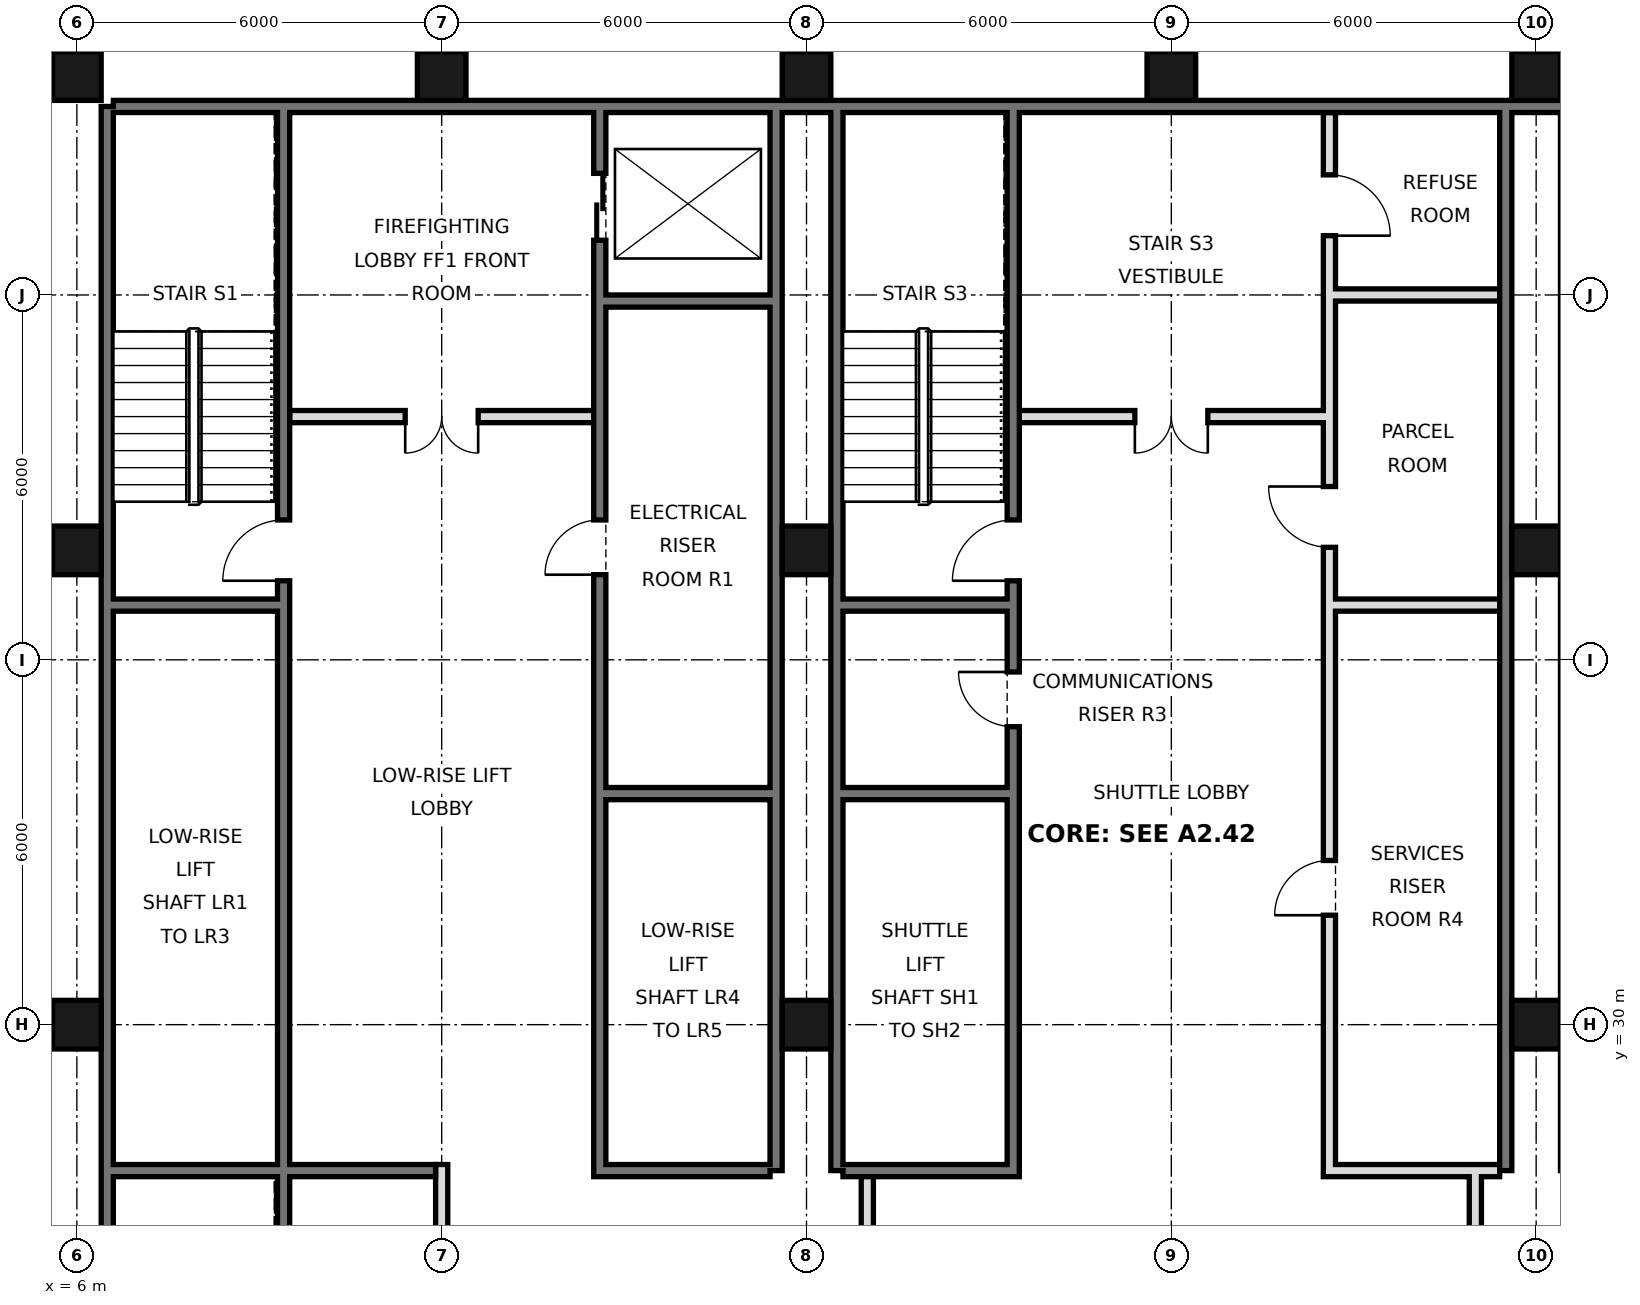
"""IFC4 building model, lengths in metres.
Left out: names, types, materials, properties, quantities, classifications, styles, units other than length and angle.
Written with IfcOpenShell. Run it as: python <this file> out.ifc"""

import sys

from ifc_helpers import new_model, si_unit, direction, frame, frame_2d, origin, origin_2d, place, context, subcontext, project, spatial, rectangle, hollow_rectangle, extrude, element, fill, save


model = new_model("IFC4")
c1 = context("Model", 3, precision=1e-05, world=origin(), true_north=direction((0.0, 1.0)))
c2 = subcontext(c1, "Body", "Model", "MODEL_VIEW")
j1 = project(units=[si_unit("LENGTHUNIT", "METRE"), si_unit("PLANEANGLEUNIT", "RADIAN")], contexts=[c1])
p1 = place(None, origin())
s1 = spatial("IfcSite", under=j1, at=p1, CompositionType="ELEMENT")
p2 = place(p1, origin())
s2 = spatial("IfcBuilding", under=s1, at=p2, CompositionType="ELEMENT")
p3 = place(p2, frame((0.0, 0.0, 167.2)))
s3 = spatial("IfcBuildingStorey", under=s2, at=p3, CompositionType="ELEMENT", Elevation=167.2)
for number, where, z_axis, x_axis in (
    (1, (6.0, 30.0, 0.0), (0.0, 0.0, 1.0), (1.0, 0.0, 0.0)),
    (2, (6.0, 37.8, 0.0), (0.0, 0.0, 1.0), (1.0, 0.0, 0.0)),
    (3, (6.0, 45.6, 0.0), (0.0, 0.0, 1.0), (1.0, 0.0, 0.0)),
    (4, (12.0, 45.6, 0.0), (0.0, 0.0, 1.0), (1.0, 0.0, 0.0)),
    (5, (18.0, 30.0, 0.0), (0.0, 0.0, 1.0), (1.0, 0.0, 0.0)),
    (6, (18.0, 37.8, 0.0), (0.0, 0.0, 1.0), (1.0, 0.0, 0.0)),
    (7, (18.0, 45.6, 0.0), (0.0, 0.0, 1.0), (1.0, 0.0, 0.0)),
    (8, (24.0, 45.6, 0.0), (0.0, 0.0, 1.0), (1.0, 0.0, 0.0)),
    (9, (30.0, 30.0, 0.0), (0.0, 0.0, 1.0), (1.0, 0.0, 0.0)),
    (10, (30.0, 37.8, 0.0), (0.0, 0.0, 1.0), (1.0, 0.0, 0.0)),
    (11, (30.0, 45.6, 0.0), (0.0, 0.0, 1.0), (1.0, 0.0, 0.0)),
):
    element("IfcColumn", number, at=place(p3, frame(where, z_axis=z_axis, x_axis=x_axis)), inside=s3, PredefinedType="COLUMN", context=c2, shape_type="SweptSolid", body=[
        extrude(hollow_rectangle(XDim=0.8, YDim=0.8, WallThickness=0.045, at=origin_2d()), origin(), (0.0, 0.0, 1.0), 3.6),
    ])
p4 = place(p3, frame((6.5, 21.6, 0.0), z_axis=(0.0, 0.0, 1.0), x_axis=(0.0, 1.0, 0.0)))
e12 = element("IfcWall", 12, at=p4, inside=s3, PredefinedType="SOLIDWALL", context=c2, shape_type="SweptSolid", body=[
    extrude(rectangle(XDim=23.5, YDim=0.2, at=frame_2d((11.75, 0.0))), origin(), (0.0, 0.0, 1.0), 3.42),
])
p5 = place(p3, frame((6.6, 45.1, 0.0), z_axis=(0.0, 0.0, 1.0), x_axis=(1.0, 0.0, 0.0)))
e13 = element("IfcWall", 13, at=p5, inside=s3, PredefinedType="SOLIDWALL", context=c2, shape_type="SweptSolid", body=[
    extrude(rectangle(XDim=34.8, YDim=0.2, at=frame_2d((17.4, 0.0))), origin(), (0.0, 0.0, 1.0), 3.42),
])
for number, where, z_axis, x_axis in (
    (14, (17.5, 27.6, 0.0), (0.0, 0.0, 1.0), (0.0, 1.0, 0.0)),
    (15, (18.5, 27.6, 0.0), (0.0, 0.0, 1.0), (0.0, 1.0, 0.0)),
    (16, (29.5, 27.6, 0.0), (0.0, 0.0, 1.0), (0.0, 1.0, 0.0)),
):
    element("IfcWall", number, at=place(p3, frame(where, z_axis=z_axis, x_axis=x_axis)), inside=s3, PredefinedType="SOLIDWALL", context=c2, shape_type="SweptSolid", body=[
        extrude(rectangle(XDim=17.5, YDim=0.2, at=frame_2d((8.75, 0.0))), origin(), (0.0, 0.0, 1.0), 3.42),
    ])
p6 = place(p3, frame((19.0, 21.6, 0.0), z_axis=(0.0, 0.0, 1.0), x_axis=(0.0, 1.0, 0.0)))
e17 = element("IfcWall", 17, at=p6, inside=s3, PredefinedType="PARTITIONING", context=c2, shape_type="SweptSolid", body=[
    extrude(rectangle(XDim=6.0, YDim=0.2, at=frame_2d((3.0, 0.0))), origin(), (0.0, 0.0, 1.0), 3.42),
])
p7 = place(p6, frame((2.1, 0.0, 0.0)))
e18 = element("IfcOpeningElement", 18, at=p7, cuts=e17, PredefinedType="OPENING", context=c2, shape_type="SweptSolid", body=[
    extrude(rectangle(XDim=1.8, YDim=2.1, at=frame_2d((0.9, 1.05))), frame((0.0, 0.11, 0.0), z_axis=(0.0, -1.0, 0.0), x_axis=(1.0, 0.0, 0.0)), (0.0, 0.0, 1.0), 0.22),
])
p8 = place(p3, frame((29.0, 21.6, 0.0), z_axis=(0.0, 0.0, 1.0), x_axis=(0.0, 1.0, 0.0)))
e19 = element("IfcWall", 19, at=p8, inside=s3, PredefinedType="PARTITIONING", context=c2, shape_type="SweptSolid", body=[
    extrude(rectangle(XDim=6.0, YDim=0.2, at=frame_2d((3.0, 0.0))), origin(), (0.0, 0.0, 1.0), 3.42),
])
p9 = place(p8, frame((2.1, 0.0, 0.0)))
e20 = element("IfcOpeningElement", 20, at=p9, cuts=e19, PredefinedType="OPENING", context=c2, shape_type="SweptSolid", body=[
    extrude(rectangle(XDim=1.8, YDim=2.1, at=frame_2d((0.9, 1.05))), frame((0.0, 0.11, 0.0), z_axis=(0.0, -1.0, 0.0), x_axis=(1.0, 0.0, 0.0)), (0.0, 0.0, 1.0), 0.22),
])
p10 = place(p3, frame((12.0, 21.6, 0.0), z_axis=(0.0, 0.0, 1.0), x_axis=(0.0, 1.0, 0.0)))
e21 = element("IfcWall", 21, at=p10, inside=s3, PredefinedType="PARTITIONING", context=c2, shape_type="SweptSolid", body=[
    extrude(rectangle(XDim=6.1, YDim=0.2, at=frame_2d((3.05, 0.0))), origin(), (0.0, 0.0, 1.0), 3.42),
])
p11 = place(p3, frame((14.6, 27.5, 0.0), z_axis=(0.0, 0.0, 1.0), x_axis=(0.0, 1.0, 0.0)))
e22 = element("IfcWall", 22, at=p11, inside=s3, PredefinedType="SOLIDWALL", context=c2, shape_type="SweptSolid", body=[
    extrude(rectangle(XDim=17.5, YDim=0.2, at=frame_2d((8.75, 0.0))), origin(), (0.0, 0.0, 1.0), 3.42),
])
p12 = place(p11, frame((15.4, 0.0, 0.0)))
e23 = element("IfcOpeningElement", 23, at=p12, cuts=e22, PredefinedType="OPENING", context=c2, shape_type="SweptSolid", body=[
    extrude(rectangle(XDim=1.1, YDim=2.1, at=frame_2d((0.55, 1.05))), frame((0.0, 0.11, 0.0), z_axis=(0.0, -1.0, 0.0), x_axis=(1.0, 0.0, 0.0)), (0.0, 0.0, 1.0), 0.22),
])
p13 = place(p11, frame((9.9, 0.0, 0.0)))
e24 = element("IfcOpeningElement", 24, at=p13, cuts=e22, PredefinedType="OPENING", context=c2, shape_type="SweptSolid", body=[
    extrude(rectangle(XDim=0.9, YDim=2.1, at=frame_2d((0.45, 1.05))), frame((0.0, 0.11, 0.0), z_axis=(0.0, -1.0, 0.0), x_axis=(1.0, 0.0, 0.0)), (0.0, 0.0, 1.0), 0.22),
])
p14 = place(p3, frame((21.4, 27.5, 0.0), z_axis=(0.0, 0.0, 1.0), x_axis=(0.0, 1.0, 0.0)))
e25 = element("IfcWall", 25, at=p14, inside=s3, PredefinedType="SOLIDWALL", context=c2, shape_type="SweptSolid", body=[
    extrude(rectangle(XDim=17.5, YDim=0.2, at=frame_2d((8.75, 0.0))), origin(), (0.0, 0.0, 1.0), 3.42),
])
p15 = place(p14, frame((9.8, 0.0, 0.0)))
e26 = element("IfcOpeningElement", 26, at=p15, cuts=e25, PredefinedType="OPENING", context=c2, shape_type="SweptSolid", body=[
    extrude(rectangle(XDim=1.0, YDim=2.1, at=frame_2d((0.5, 1.05))), frame((0.0, 0.11, 0.0), z_axis=(0.0, -1.0, 0.0), x_axis=(1.0, 0.0, 0.0)), (0.0, 0.0, 1.0), 0.22),
])
p16 = place(p14, frame((7.4, 0.0, 0.0)))
e27 = element("IfcOpeningElement", 27, at=p16, cuts=e25, PredefinedType="OPENING", context=c2, shape_type="SweptSolid", body=[
    extrude(rectangle(XDim=0.9, YDim=2.1, at=frame_2d((0.45, 1.05))), frame((0.0, 0.11, 0.0), z_axis=(0.0, -1.0, 0.0), x_axis=(1.0, 0.0, 0.0)), (0.0, 0.0, 1.0), 0.22),
])
p17 = place(p3, frame((26.6, 27.5, 0.0), z_axis=(0.0, 0.0, 1.0), x_axis=(0.0, 1.0, 0.0)))
e28 = element("IfcWall", 28, at=p17, inside=s3, PredefinedType="SOLIDWALL", context=c2, shape_type="SweptSolid", body=[
    extrude(rectangle(XDim=17.5, YDim=0.2, at=frame_2d((8.75, 0.0))), origin(), (0.0, 0.0, 1.0), 3.42),
])
p18 = place(p17, frame((4.3, 0.0, 0.0)))
e29 = element("IfcOpeningElement", 29, at=p18, cuts=e28, PredefinedType="OPENING", context=c2, shape_type="SweptSolid", body=[
    extrude(rectangle(XDim=0.9, YDim=2.1, at=frame_2d((0.45, 1.05))), frame((0.0, 0.11, 0.0), z_axis=(0.0, -1.0, 0.0), x_axis=(1.0, 0.0, 0.0)), (0.0, 0.0, 1.0), 0.22),
])
p19 = place(p17, frame((10.35, 0.0, 0.0)))
e30 = element("IfcOpeningElement", 30, at=p19, cuts=e28, PredefinedType="OPENING", context=c2, shape_type="SweptSolid", body=[
    extrude(rectangle(XDim=1.0, YDim=2.1, at=frame_2d((0.5, 1.05))), frame((0.0, 0.11, 0.0), z_axis=(0.0, -1.0, 0.0), x_axis=(1.0, 0.0, 0.0)), (0.0, 0.0, 1.0), 0.22),
])
p20 = place(p17, frame((15.475, 0.0, 0.0)))
e31 = element("IfcOpeningElement", 31, at=p20, cuts=e28, PredefinedType="OPENING", context=c2, shape_type="SweptSolid", body=[
    extrude(rectangle(XDim=1.0, YDim=2.1, at=frame_2d((0.5, 1.05))), frame((0.0, 0.11, 0.0), z_axis=(0.0, -1.0, 0.0), x_axis=(1.0, 0.0, 0.0)), (0.0, 0.0, 1.0), 0.22),
])
p21 = place(p3, frame((9.4, 21.6, 0.0), z_axis=(0.0, 0.0, 1.0), x_axis=(0.0, 1.0, 0.0)))
e32 = element("IfcWall", 32, at=p21, inside=s3, PredefinedType="SOLIDWALL", context=c2, shape_type="SweptSolid", body=[
    extrude(rectangle(XDim=23.4, YDim=0.2, at=frame_2d((11.7, 0.0))), origin(), (0.0, 0.0, 1.0), 3.42),
])
p22 = place(p21, frame((15.7, 0.0, 0.0)))
e33 = element("IfcOpeningElement", 33, at=p22, cuts=e32, PredefinedType="OPENING", context=c2, shape_type="SweptSolid", body=[
    extrude(rectangle(XDim=1.0, YDim=2.1, at=frame_2d((0.5, 1.05))), frame((0.0, 0.11, 0.0), z_axis=(0.0, -1.0, 0.0), x_axis=(1.0, 0.0, 0.0)), (0.0, 0.0, 1.0), 0.22),
])
p23 = place(p21, frame((0.175, 0.0, 0.0)))
e34 = element("IfcOpeningElement", 34, at=p23, cuts=e32, PredefinedType="OPENING", context=c2, shape_type="SweptSolid", body=[
    extrude(rectangle(XDim=0.9, YDim=2.1, at=frame_2d((0.45, 1.05))), frame((0.0, 0.11, 0.0), z_axis=(0.0, -1.0, 0.0), x_axis=(1.0, 0.0, 0.0)), (0.0, 0.0, 1.0), 0.22),
])
for number, where, z_axis, x_axis in (
    (35, (14.7, 27.6, 0.0), (0.0, 0.0, 1.0), (1.0, 0.0, 0.0)),
    (36, (18.6, 27.6, 0.0), (0.0, 0.0, 1.0), (1.0, 0.0, 0.0)),
    (37, (26.7, 27.6, 0.0), (0.0, 0.0, 1.0), (1.0, 0.0, 0.0)),
):
    element("IfcWall", number, at=place(p3, frame(where, z_axis=z_axis, x_axis=x_axis)), inside=s3, PredefinedType="SOLIDWALL", context=c2, shape_type="SweptSolid", body=[
        extrude(rectangle(XDim=2.7, YDim=0.2, at=frame_2d((1.35, 0.0))), origin(), (0.0, 0.0, 1.0), 3.42),
    ])
p24 = place(p3, frame((6.6, 27.6, 0.0), z_axis=(0.0, 0.0, 1.0), x_axis=(1.0, 0.0, 0.0)))
e38 = element("IfcWall", 38, at=p24, inside=s3, PredefinedType="SOLIDWALL", context=c2, shape_type="SweptSolid", body=[
    extrude(rectangle(XDim=5.3, YDim=0.2, at=frame_2d((2.65, 0.0))), origin(), (0.0, 0.0, 1.0), 3.42),
])
for number, where, z_axis, x_axis in (
    (39, (14.7, 33.8, 0.0), (0.0, 0.0, 1.0), (1.0, 0.0, 0.0)),
    (40, (18.6, 33.8, 0.0), (0.0, 0.0, 1.0), (1.0, 0.0, 0.0)),
    (41, (18.6, 36.9, 0.0), (0.0, 0.0, 1.0), (1.0, 0.0, 0.0)),
    (42, (26.7, 36.9, 0.0), (0.0, 0.0, 1.0), (1.0, 0.0, 0.0)),
    (43, (6.6, 36.9, 0.0), (0.0, 0.0, 1.0), (1.0, 0.0, 0.0)),
):
    element("IfcWall", number, at=place(p3, frame(where, z_axis=z_axis, x_axis=x_axis)), inside=s3, PredefinedType="SOLIDWALL", context=c2, shape_type="SweptSolid", body=[
        extrude(rectangle(XDim=2.7, YDim=0.2, at=frame_2d((1.35, 0.0))), origin(), (0.0, 0.0, 1.0), 3.42),
    ])
p25 = place(p3, frame((21.5, 40.0, 0.0), z_axis=(0.0, 0.0, 1.0), x_axis=(1.0, 0.0, 0.0)))
e44 = element("IfcWall", 44, at=p25, inside=s3, PredefinedType="PARTITIONING", context=c2, shape_type="SweptSolid", body=[
    extrude(rectangle(XDim=5.0, YDim=0.2, at=frame_2d((2.5, 0.0))), origin(), (0.0, 0.0, 1.0), 3.42),
])
p26 = place(p25, frame((1.9, 0.0, 0.0)))
e45 = element("IfcOpeningElement", 45, at=p26, cuts=e44, PredefinedType="OPENING", context=c2, shape_type="SweptSolid", body=[
    extrude(rectangle(XDim=1.2, YDim=2.1, at=frame_2d((0.6, 1.05))), frame((0.0, 0.11, 0.0), z_axis=(0.0, -1.0, 0.0), x_axis=(1.0, 0.0, 0.0)), (0.0, 0.0, 1.0), 0.22),
])
p27 = place(p3, frame((9.5, 40.0, 0.0), z_axis=(0.0, 0.0, 1.0), x_axis=(1.0, 0.0, 0.0)))
e46 = element("IfcWall", 46, at=p27, inside=s3, PredefinedType="PARTITIONING", context=c2, shape_type="SweptSolid", body=[
    extrude(rectangle(XDim=5.0, YDim=0.2, at=frame_2d((2.5, 0.0))), origin(), (0.0, 0.0, 1.0), 3.42),
])
p28 = place(p27, frame((1.9, 0.0, 0.0)))
e47 = element("IfcOpeningElement", 47, at=p28, cuts=e46, PredefinedType="OPENING", context=c2, shape_type="SweptSolid", body=[
    extrude(rectangle(XDim=1.2, YDim=2.1, at=frame_2d((0.6, 1.05))), frame((0.0, 0.11, 0.0), z_axis=(0.0, -1.0, 0.0), x_axis=(1.0, 0.0, 0.0)), (0.0, 0.0, 1.0), 0.22),
])
p29 = place(p3, frame((14.7, 41.9, 0.0), z_axis=(0.0, 0.0, 1.0), x_axis=(1.0, 0.0, 0.0)))
e48 = element("IfcWall", 48, at=p29, inside=s3, PredefinedType="SOLIDWALL", context=c2, shape_type="SweptSolid", body=[
    extrude(rectangle(XDim=2.7, YDim=0.2, at=frame_2d((1.35, 0.0))), origin(), (0.0, 0.0, 1.0), 3.42),
])
p30 = place(p3, frame((26.7, 42.0, 0.0), z_axis=(0.0, 0.0, 1.0), x_axis=(1.0, 0.0, 0.0)))
e49 = element("IfcWall", 49, at=p30, inside=s3, PredefinedType="PARTITIONING", context=c2, shape_type="SweptSolid", body=[
    extrude(rectangle(XDim=2.7, YDim=0.2, at=frame_2d((1.35, 0.0))), origin(), (0.0, 0.0, 1.0), 3.42),
])
p31 = place(p28, frame((1.2, 0.0, 0.0), z_axis=(0.0, 0.0, 1.0), x_axis=(-1.0, 0.0, 0.0)))
e50 = element("IfcDoor", 50, at=p31, inside=s3, OperationType="DOUBLE_DOOR_SINGLE_SWING", PredefinedType="DOOR", context=c2, shape_type="SweptSolid", body=[
    extrude(rectangle(XDim=1.2, YDim=2.1, at=frame_2d((0.6, 1.05))), frame((0.0, 0.025, 0.0), z_axis=(0.0, -1.0, 0.0), x_axis=(1.0, 0.0, 0.0)), (0.0, 0.0, 1.0), 0.05),
])
fill(e47, e50)
p32 = place(p26, frame((1.2, 0.0, 0.0), z_axis=(0.0, 0.0, 1.0), x_axis=(-1.0, 0.0, 0.0)))
e51 = element("IfcDoor", 51, at=p32, inside=s3, OperationType="DOUBLE_DOOR_SINGLE_SWING", PredefinedType="DOOR", context=c2, shape_type="SweptSolid", body=[
    extrude(rectangle(XDim=1.2, YDim=2.1, at=frame_2d((0.6, 1.05))), frame((0.0, 0.025, 0.0), z_axis=(0.0, -1.0, 0.0), x_axis=(1.0, 0.0, 0.0)), (0.0, 0.0, 1.0), 0.05),
])
fill(e45, e51)
p33 = place(p12, origin())
e52 = element("IfcDoor", 52, at=p33, inside=s3, OperationType="DOUBLE_DOOR_SLIDING", PredefinedType="DOOR", context=c2, shape_type="SweptSolid", body=[
    extrude(rectangle(XDim=1.1, YDim=2.1, at=frame_2d((0.55, 1.05))), frame((0.0, 0.025, 0.0), z_axis=(0.0, -1.0, 0.0), x_axis=(1.0, 0.0, 0.0)), (0.0, 0.0, 1.0), 0.05),
])
fill(e23, e52)
p34 = place(p22, origin())
e53 = element("IfcDoor", 53, at=p34, inside=s3, OperationType="SINGLE_SWING_LEFT", PredefinedType="DOOR", context=c2, shape_type="SweptSolid", body=[
    extrude(rectangle(XDim=1.0, YDim=2.1, at=frame_2d((0.5, 1.05))), frame((0.0, 0.025, 0.0), z_axis=(0.0, -1.0, 0.0), x_axis=(1.0, 0.0, 0.0)), (0.0, 0.0, 1.0), 0.05),
])
fill(e33, e53)
p35 = place(p15, origin())
e54 = element("IfcDoor", 54, at=p35, inside=s3, OperationType="SINGLE_SWING_LEFT", PredefinedType="DOOR", context=c2, shape_type="SweptSolid", body=[
    extrude(rectangle(XDim=1.0, YDim=2.1, at=frame_2d((0.5, 1.05))), frame((0.0, 0.025, 0.0), z_axis=(0.0, -1.0, 0.0), x_axis=(1.0, 0.0, 0.0)), (0.0, 0.0, 1.0), 0.05),
])
fill(e26, e54)
p36 = place(p13, origin())
e55 = element("IfcDoor", 55, at=p36, inside=s3, OperationType="SINGLE_SWING_LEFT", PredefinedType="DOOR", context=c2, shape_type="SweptSolid", body=[
    extrude(rectangle(XDim=0.9, YDim=2.1, at=frame_2d((0.45, 1.05))), frame((0.0, 0.025, 0.0), z_axis=(0.0, -1.0, 0.0), x_axis=(1.0, 0.0, 0.0)), (0.0, 0.0, 1.0), 0.05),
])
fill(e24, e55)
p37 = place(p16, frame((0.9, 0.0, 0.0), z_axis=(0.0, 0.0, 1.0), x_axis=(-1.0, 0.0, 0.0)))
e56 = element("IfcDoor", 56, at=p37, inside=s3, OperationType="SINGLE_SWING_LEFT", PredefinedType="DOOR", context=c2, shape_type="SweptSolid", body=[
    extrude(rectangle(XDim=0.9, YDim=2.1, at=frame_2d((0.45, 1.05))), frame((0.0, 0.025, 0.0), z_axis=(0.0, -1.0, 0.0), x_axis=(1.0, 0.0, 0.0)), (0.0, 0.0, 1.0), 0.05),
])
fill(e27, e56)
p38 = place(p18, origin())
e57 = element("IfcDoor", 57, at=p38, inside=s3, OperationType="SINGLE_SWING_LEFT", PredefinedType="DOOR", context=c2, shape_type="SweptSolid", body=[
    extrude(rectangle(XDim=0.9, YDim=2.1, at=frame_2d((0.45, 1.05))), frame((0.0, 0.025, 0.0), z_axis=(0.0, -1.0, 0.0), x_axis=(1.0, 0.0, 0.0)), (0.0, 0.0, 1.0), 0.05),
])
fill(e29, e57)
p39 = place(p19, frame((1.0, 0.0, 0.0), z_axis=(0.0, 0.0, 1.0), x_axis=(-1.0, 0.0, 0.0)))
e58 = element("IfcDoor", 58, at=p39, inside=s3, OperationType="SINGLE_SWING_LEFT", PredefinedType="DOOR", context=c2, shape_type="SweptSolid", body=[
    extrude(rectangle(XDim=1.0, YDim=2.1, at=frame_2d((0.5, 1.05))), frame((0.0, 0.025, 0.0), z_axis=(0.0, -1.0, 0.0), x_axis=(1.0, 0.0, 0.0)), (0.0, 0.0, 1.0), 0.05),
])
fill(e30, e58)
p40 = place(p20, frame((1.0, 0.0, 0.0), z_axis=(0.0, 0.0, 1.0), x_axis=(-1.0, 0.0, 0.0)))
e59 = element("IfcDoor", 59, at=p40, inside=s3, OperationType="SINGLE_SWING_RIGHT", PredefinedType="DOOR", context=c2, shape_type="SweptSolid", body=[
    extrude(rectangle(XDim=1.0, YDim=2.1, at=frame_2d((0.5, 1.05))), frame((0.0, 0.025, 0.0), z_axis=(0.0, -1.0, 0.0), x_axis=(1.0, 0.0, 0.0)), (0.0, 0.0, 1.0), 0.05),
])
fill(e31, e59)
save(model, sys.argv[1])
